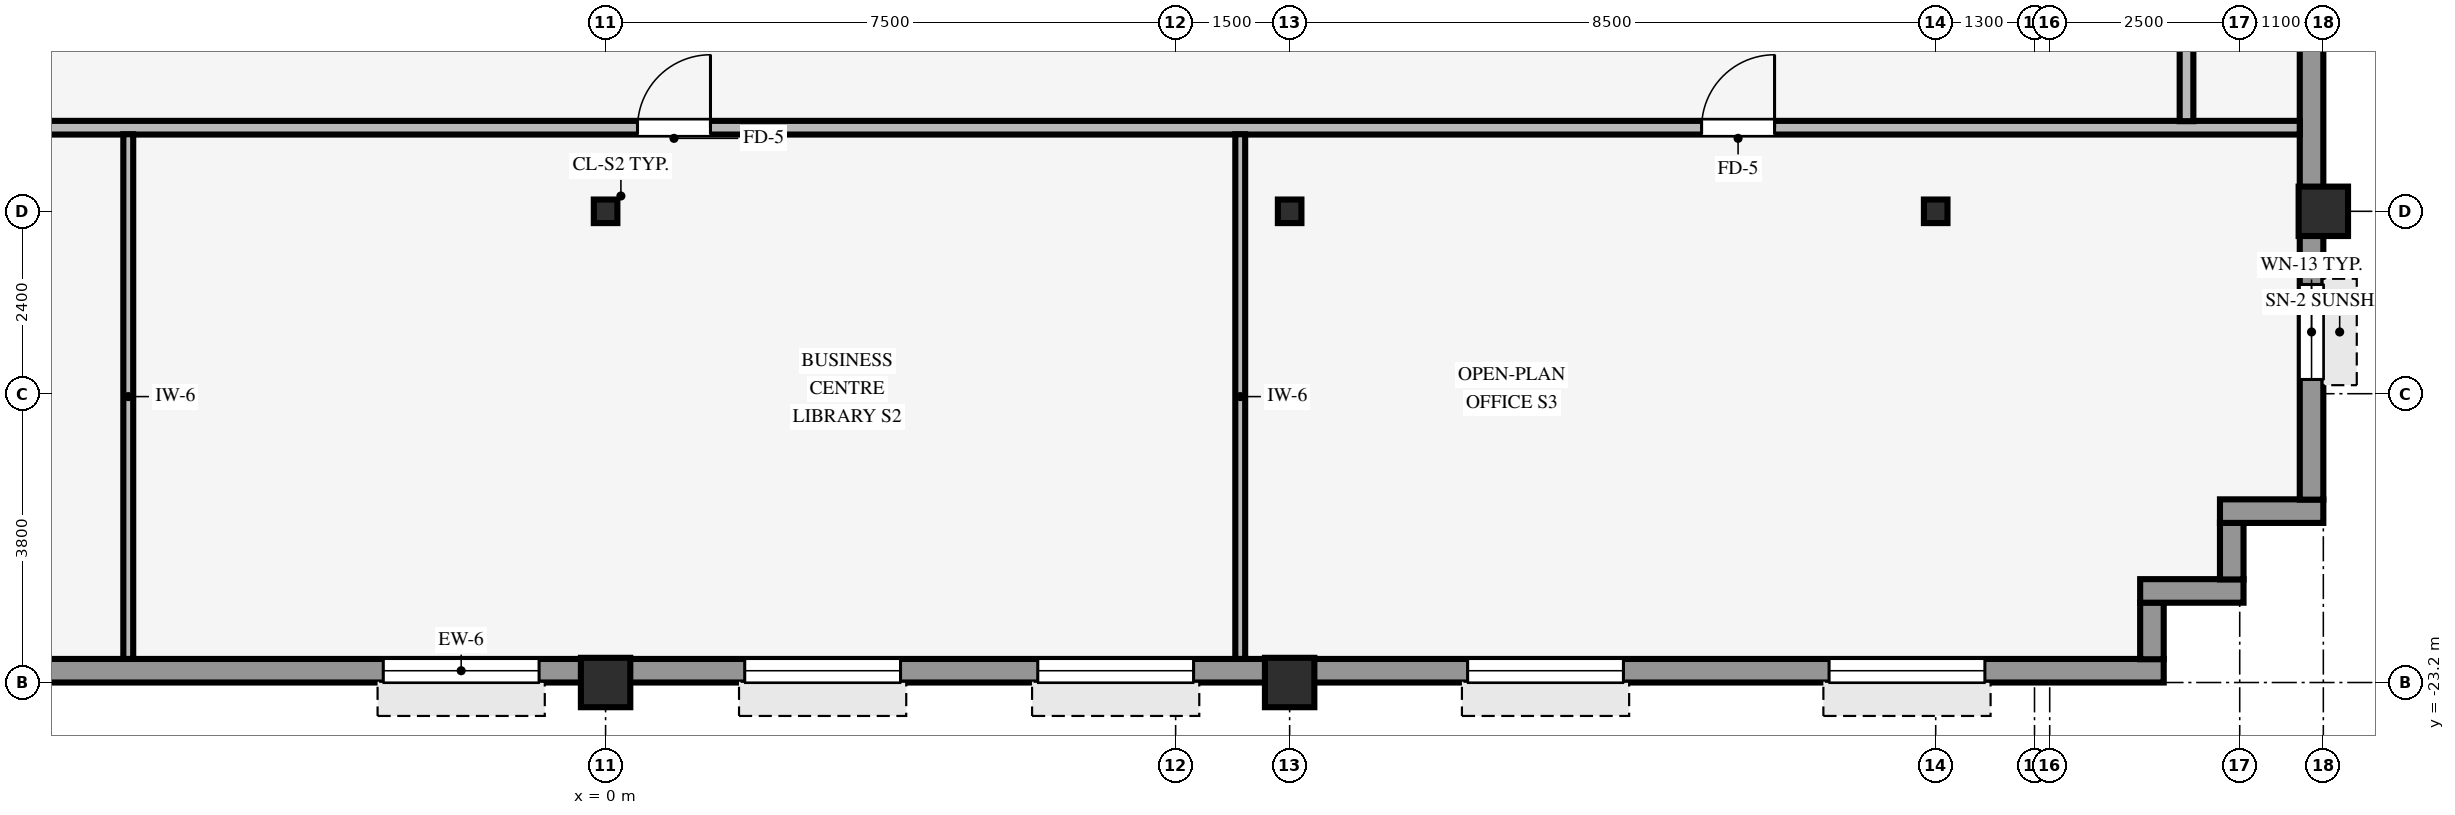
"""IFC4 building model, lengths in metres.
Left out: names, types, materials, properties, quantities, classifications, styles, units other than length and angle.
Written with IfcOpenShell. Run it as: python <this file> out.ifc"""

import sys

from ifc_helpers import new_model, si_unit, direction, frame, frame_2d, origin, origin_2d, place, context, subcontext, project, spatial, rectangle, hollow_rectangle, i_section, extrude, source, transform, mapped, element, fill, save


model = new_model("IFC4")
c1 = context("Model", 3, precision=1e-05, world=origin(), true_north=direction((0.0, 1.0)))
c2 = subcontext(c1, "Body", "Model", "MODEL_VIEW")
j1 = project(units=[si_unit("LENGTHUNIT", "METRE"), si_unit("PLANEANGLEUNIT", "RADIAN")], contexts=[c1])
p1 = place(None, origin())
s1 = spatial("IfcSite", under=j1, at=p1, CompositionType="ELEMENT")
p2 = place(p1, origin())
s2 = spatial("IfcBuilding", under=s1, at=p2, CompositionType="ELEMENT")
p3 = place(p2, frame((0.0, 0.0, 174.95)))
s3 = spatial("IfcBuildingStorey", under=s2, at=p3, CompositionType="ELEMENT", Elevation=174.95)
for number, where, z_axis, x_axis in (
    (1, (22.6, -17.0, 0.0), (0.0, 0.0, 1.0), (1.0, 0.0, 0.0)),
    (2, (0.0, -23.2, 0.0), (0.0, 0.0, 1.0), (1.0, 0.0, 0.0)),
    (3, (9.0, -23.2, 0.0), (0.0, 0.0, 1.0), (1.0, 0.0, 0.0)),
):
    element("IfcColumn", number, at=place(p3, frame(where, z_axis=z_axis, x_axis=x_axis)), inside=s3, PredefinedType="COLUMN", context=c2, shape_type="SweptSolid", body=[
        extrude(hollow_rectangle(XDim=0.65, YDim=0.65, WallThickness=0.04, InnerFilletRadius=0.04, OuterFilletRadius=0.08, at=origin_2d()), origin(), (0.0, 0.0, 1.0), 3.37),
    ])
for number, where, z_axis, x_axis in (
    (4, (0.0, -17.0, 0.0), (0.0, 0.0, 1.0), (1.0, 0.0, 0.0)),
    (5, (9.0, -17.0, 0.0), (0.0, 0.0, 1.0), (1.0, 0.0, 0.0)),
    (6, (17.5, -17.0, 0.0), (0.0, 0.0, 1.0), (1.0, 0.0, 0.0)),
):
    element("IfcColumn", number, at=place(p3, frame(where, z_axis=z_axis, x_axis=x_axis)), inside=s3, PredefinedType="COLUMN", context=c2, shape_type="SweptSolid", body=[
        extrude(i_section(OverallWidth=0.31, OverallDepth=0.31, WebThickness=0.015, FlangeThickness=0.015, FilletRadius=0.015, at=origin_2d()), origin(), (0.0, 0.0, 1.0), 3.37),
    ])
p4 = place(p3, frame((-24.3, -23.045, 0.0), z_axis=(0.0, 0.0, 1.0), x_axis=(1.0, 0.0, 0.0)))
e7 = element("IfcWall", 7, at=p4, inside=s3, PredefinedType="STANDARD", context=c2, shape_type="SweptSolid", body=[
    extrude(rectangle(XDim=44.8, YDim=0.31, at=frame_2d((22.4, 0.0))), origin(), (0.0, 0.0, 1.0), 2.705),
])
p5 = place(p4, frame((2.353, 0.0, 0.8)))
e8 = element("IfcOpeningElement", 8, at=p5, cuts=e7, PredefinedType="OPENING", context=c2, shape_type="SweptSolid", body=[
    extrude(rectangle(XDim=2.05, YDim=1.52, at=frame_2d((1.025, 0.76))), frame((0.0, 0.165, 0.0), z_axis=(0.0, -1.0, 0.0), x_axis=(1.0, 0.0, 0.0)), (0.0, 0.0, 1.0), 0.33),
])
p6 = place(p4, frame((7.108, 0.0, 0.8)))
e9 = element("IfcOpeningElement", 9, at=p6, cuts=e7, PredefinedType="OPENING", context=c2, shape_type="SweptSolid", body=[
    extrude(rectangle(XDim=2.05, YDim=1.52, at=frame_2d((1.025, 0.76))), frame((0.0, 0.165, 0.0), z_axis=(0.0, -1.0, 0.0), x_axis=(1.0, 0.0, 0.0)), (0.0, 0.0, 1.0), 0.33),
])
p7 = place(p4, frame((11.864, 0.0, 0.8)))
e10 = element("IfcOpeningElement", 10, at=p7, cuts=e7, PredefinedType="OPENING", context=c2, shape_type="SweptSolid", body=[
    extrude(rectangle(XDim=2.05, YDim=1.52, at=frame_2d((1.025, 0.76))), frame((0.0, 0.165, 0.0), z_axis=(0.0, -1.0, 0.0), x_axis=(1.0, 0.0, 0.0)), (0.0, 0.0, 1.0), 0.33),
])
p8 = place(p4, frame((21.375, 0.0, 0.8)))
e11 = element("IfcOpeningElement", 11, at=p8, cuts=e7, PredefinedType="OPENING", context=c2, shape_type="SweptSolid", body=[
    extrude(rectangle(XDim=2.05, YDim=1.52, at=frame_2d((1.025, 0.76))), frame((0.0, 0.165, 0.0), z_axis=(0.0, -1.0, 0.0), x_axis=(1.0, 0.0, 0.0)), (0.0, 0.0, 1.0), 0.33),
])
p9 = place(p4, frame((26.131, 0.0, 0.8)))
e12 = element("IfcOpeningElement", 12, at=p9, cuts=e7, PredefinedType="OPENING", context=c2, shape_type="SweptSolid", body=[
    extrude(rectangle(XDim=2.05, YDim=1.52, at=frame_2d((1.025, 0.76))), frame((0.0, 0.165, 0.0), z_axis=(0.0, -1.0, 0.0), x_axis=(1.0, 0.0, 0.0)), (0.0, 0.0, 1.0), 0.33),
])
p10 = place(p4, frame((29.986, 0.0, 0.8)))
e13 = element("IfcOpeningElement", 13, at=p10, cuts=e7, PredefinedType="OPENING", context=c2, shape_type="SweptSolid", body=[
    extrude(rectangle(XDim=2.05, YDim=1.52, at=frame_2d((1.025, 0.76))), frame((0.0, 0.165, 0.0), z_axis=(0.0, -1.0, 0.0), x_axis=(1.0, 0.0, 0.0)), (0.0, 0.0, 1.0), 0.33),
])
p11 = place(p4, frame((35.642, 0.0, 0.8)))
e14 = element("IfcOpeningElement", 14, at=p11, cuts=e7, PredefinedType="OPENING", context=c2, shape_type="SweptSolid", body=[
    extrude(rectangle(XDim=2.05, YDim=1.52, at=frame_2d((1.025, 0.76))), frame((0.0, 0.165, 0.0), z_axis=(0.0, -1.0, 0.0), x_axis=(1.0, 0.0, 0.0)), (0.0, 0.0, 1.0), 0.33),
])
p12 = place(p4, frame((40.397, 0.0, 0.8)))
e15 = element("IfcOpeningElement", 15, at=p12, cuts=e7, PredefinedType="OPENING", context=c2, shape_type="SweptSolid", body=[
    extrude(rectangle(XDim=2.05, YDim=1.52, at=frame_2d((1.025, 0.76))), frame((0.0, 0.165, 0.0), z_axis=(0.0, -1.0, 0.0), x_axis=(1.0, 0.0, 0.0)), (0.0, 0.0, 1.0), 0.33),
])
p13 = place(p3, frame((20.345, -22.894, 0.0), z_axis=(0.0, 0.0, 1.0), x_axis=(0.0, 1.0, 0.0)))
e16 = element("IfcWall", 16, at=p13, inside=s3, PredefinedType="STANDARD", context=c2, shape_type="SweptSolid", body=[
    extrude(rectangle(XDim=0.748, YDim=0.31, at=frame_2d((0.374, 0.0))), origin(), (0.0, 0.0, 1.0), 3.36),
])
p14 = place(p3, frame((20.19, -21.995, 0.0), z_axis=(0.0, 0.0, 1.0), x_axis=(1.0, 0.0, 0.0)))
e17 = element("IfcWall", 17, at=p14, inside=s3, PredefinedType="STANDARD", context=c2, shape_type="SweptSolid", body=[
    extrude(rectangle(XDim=1.36, YDim=0.31, at=frame_2d((0.68, 0.0))), origin(), (0.0, 0.0, 1.0), 3.36),
])
p15 = place(p3, frame((21.395, -21.844, 0.0), z_axis=(0.0, 0.0, 1.0), x_axis=(0.0, 1.0, 0.0)))
e18 = element("IfcWall", 18, at=p15, inside=s3, PredefinedType="STANDARD", context=c2, shape_type="SweptSolid", body=[
    extrude(rectangle(XDim=0.748, YDim=0.31, at=frame_2d((0.374, 0.0))), origin(), (0.0, 0.0, 1.0), 3.36),
])
p16 = place(p3, frame((21.24, -20.945, 0.0), z_axis=(0.0, 0.0, 1.0), x_axis=(1.0, 0.0, 0.0)))
e19 = element("IfcWall", 19, at=p16, inside=s3, PredefinedType="STANDARD", context=c2, shape_type="SweptSolid", body=[
    extrude(rectangle(XDim=1.36, YDim=0.31, at=frame_2d((0.68, 0.0))), origin(), (0.0, 0.0, 1.0), 3.36),
])
p17 = place(p3, frame((22.445, -20.794, 0.0), z_axis=(0.0, 0.0, 1.0), x_axis=(0.0, 1.0, 0.0)))
e20 = element("IfcWall", 20, at=p17, inside=s3, PredefinedType="STANDARD", context=c2, shape_type="SweptSolid", body=[
    extrude(rectangle(XDim=37.788, YDim=0.31, at=frame_2d((18.894, 0.0))), origin(), (0.0, 0.0, 1.0), 2.705),
])
p18 = place(p17, frame((16.474, 0.0, 0.0), z_axis=(0.0, 0.0, 1.0), x_axis=(-1.0, 0.0, 0.0)))
e21 = element("IfcOpeningElement", 21, at=p18, cuts=e20, PredefinedType="OPENING", context=c2, shape_type="SweptSolid", body=[
    extrude(rectangle(XDim=0.98, YDim=2.15, at=frame_2d((0.49, 1.075))), frame((0.0, 0.165, 0.0), z_axis=(0.0, -1.0, 0.0), x_axis=(1.0, 0.0, 0.0)), (0.0, 0.0, 1.0), 0.33),
])
p19 = place(p17, frame((1.581, 0.0, 0.8)))
e22 = element("IfcOpeningElement", 22, at=p19, cuts=e20, PredefinedType="OPENING", context=c2, shape_type="SweptSolid", body=[
    extrude(rectangle(XDim=1.25, YDim=1.52, at=frame_2d((0.625, 0.76))), frame((0.0, 0.165, 0.0), z_axis=(0.0, -1.0, 0.0), x_axis=(1.0, 0.0, 0.0)), (0.0, 0.0, 1.0), 0.33),
])
p20 = place(p17, frame((8.044, 0.0, 0.8)))
e23 = element("IfcOpeningElement", 23, at=p20, cuts=e20, PredefinedType="OPENING", context=c2, shape_type="SweptSolid", body=[
    extrude(rectangle(XDim=1.25, YDim=1.52, at=frame_2d((0.625, 0.76))), frame((0.0, 0.165, 0.0), z_axis=(0.0, -1.0, 0.0), x_axis=(1.0, 0.0, 0.0)), (0.0, 0.0, 1.0), 0.33),
])
p21 = place(p17, frame((13.156, 0.0, 0.8)))
e24 = element("IfcOpeningElement", 24, at=p21, cuts=e20, PredefinedType="OPENING", context=c2, shape_type="SweptSolid", body=[
    extrude(rectangle(XDim=1.25, YDim=1.52, at=frame_2d((0.625, 0.76))), frame((0.0, 0.165, 0.0), z_axis=(0.0, -1.0, 0.0), x_axis=(1.0, 0.0, 0.0)), (0.0, 0.0, 1.0), 0.33),
])
p22 = place(p17, frame((18.269, 0.0, 0.8)))
e25 = element("IfcOpeningElement", 25, at=p22, cuts=e20, PredefinedType="OPENING", context=c2, shape_type="SweptSolid", body=[
    extrude(rectangle(XDim=1.25, YDim=1.52, at=frame_2d((0.625, 0.76))), frame((0.0, 0.165, 0.0), z_axis=(0.0, -1.0, 0.0), x_axis=(1.0, 0.0, 0.0)), (0.0, 0.0, 1.0), 0.33),
])
p23 = place(p17, frame((23.382, 0.0, 0.8)))
e26 = element("IfcOpeningElement", 26, at=p23, cuts=e20, PredefinedType="OPENING", context=c2, shape_type="SweptSolid", body=[
    extrude(rectangle(XDim=1.25, YDim=1.52, at=frame_2d((0.625, 0.76))), frame((0.0, 0.165, 0.0), z_axis=(0.0, -1.0, 0.0), x_axis=(1.0, 0.0, 0.0)), (0.0, 0.0, 1.0), 0.33),
])
p24 = place(p17, frame((28.044, 0.0, 0.8)))
e27 = element("IfcOpeningElement", 27, at=p24, cuts=e20, PredefinedType="OPENING", context=c2, shape_type="SweptSolid", body=[
    extrude(rectangle(XDim=1.25, YDim=1.52, at=frame_2d((0.625, 0.76))), frame((0.0, 0.165, 0.0), z_axis=(0.0, -1.0, 0.0), x_axis=(1.0, 0.0, 0.0)), (0.0, 0.0, 1.0), 0.33),
])
p25 = place(p17, frame((33.607, 0.0, 0.8)))
e28 = element("IfcOpeningElement", 28, at=p25, cuts=e20, PredefinedType="OPENING", context=c2, shape_type="SweptSolid", body=[
    extrude(rectangle(XDim=1.25, YDim=1.52, at=frame_2d((0.625, 0.76))), frame((0.0, 0.165, 0.0), z_axis=(0.0, -1.0, 0.0), x_axis=(1.0, 0.0, 0.0)), (0.0, 0.0, 1.0), 0.33),
])
p26 = place(p3, frame((-26.09, -15.9, 0.0), z_axis=(0.0, 0.0, 1.0), x_axis=(1.0, 0.0, 0.0)))
e29 = element("IfcWall", 29, at=p26, inside=s3, PredefinedType="PARTITIONING", context=c2, shape_type="SweptSolid", body=[
    extrude(rectangle(XDim=48.38, YDim=0.18, at=frame_2d((24.19, 0.0))), origin(), (0.0, 0.0, 1.0), 3.36),
])
p27 = place(p26, frame((26.51, 0.0, 0.0)))
e30 = element("IfcOpeningElement", 30, at=p27, cuts=e29, PredefinedType="OPENING", context=c2, shape_type="SweptSolid", body=[
    extrude(rectangle(XDim=0.96, YDim=2.1, at=frame_2d((0.48, 1.05))), frame((0.0, 0.1, 0.0), z_axis=(0.0, -1.0, 0.0), x_axis=(1.0, 0.0, 0.0)), (0.0, 0.0, 1.0), 0.2),
])
p28 = place(p26, frame((40.51, 0.0, 0.0)))
e31 = element("IfcOpeningElement", 31, at=p28, cuts=e29, PredefinedType="OPENING", context=c2, shape_type="SweptSolid", body=[
    extrude(rectangle(XDim=0.96, YDim=2.1, at=frame_2d((0.48, 1.05))), frame((0.0, 0.1, 0.0), z_axis=(0.0, -1.0, 0.0), x_axis=(1.0, 0.0, 0.0)), (0.0, 0.0, 1.0), 0.2),
])
p29 = place(p26, frame((13.62, 0.0, 0.0)))
e32 = element("IfcOpeningElement", 32, at=p29, cuts=e29, PredefinedType="OPENING", context=c2, shape_type="SweptSolid", body=[
    extrude(rectangle(XDim=0.96, YDim=2.1, at=frame_2d((0.48, 1.05))), frame((0.0, 0.1, 0.0), z_axis=(0.0, -1.0, 0.0), x_axis=(1.0, 0.0, 0.0)), (0.0, 0.0, 1.0), 0.2),
])
for number, where, z_axis, x_axis in (
    (33, (-6.28, -22.89, 0.0), (0.0, 0.0, 1.0), (0.0, 1.0, 0.0)),
    (34, (8.35, -22.89, 0.0), (0.0, 0.0, 1.0), (0.0, 1.0, 0.0)),
):
    element("IfcWall", number, at=place(p3, frame(where, z_axis=z_axis, x_axis=x_axis)), inside=s3, PredefinedType="PARTITIONING", context=c2, shape_type="SweptSolid", body=[
        extrude(rectangle(XDim=6.904, YDim=0.13, at=frame_2d((3.452, 0.0))), origin(), (0.0, 0.0, 1.0), 3.36),
    ])
p30 = place(p3, frame((20.8, -15.814, 0.0), z_axis=(0.0, 0.0, 1.0), x_axis=(0.0, 1.0, 0.0)))
e35 = element("IfcWall", 35, at=p30, inside=s3, PredefinedType="PARTITIONING", context=c2, shape_type="SweptSolid", body=[
    extrude(rectangle(XDim=2.228, YDim=0.18, at=frame_2d((1.114, 0.0))), origin(), (0.0, 0.0, 1.0), 3.36),
])
m1 = source(origin(), c2, "Body", "SweptSolid", [
    extrude(rectangle(XDim=2.05, YDim=1.52, at=frame_2d((1.025, 0.76))), frame((0.0, 0.03, 0.0), z_axis=(0.0, -1.0, 0.0), x_axis=(1.0, 0.0, 0.0)), (0.0, 0.0, 1.0), 0.06),
])
p31 = place(p8, origin())
e36 = element("IfcWindow", 36, at=p31, inside=s3, PartitioningType="SINGLE_PANEL", PredefinedType="WINDOW", context=c2, shape_type="MappedRepresentation", body=[
    mapped(m1, transform((0.0, 0.0, 0.0), scale=1.0)),
])
fill(e11, e36)
p32 = place(p9, origin())
e37 = element("IfcWindow", 37, at=p32, inside=s3, PartitioningType="SINGLE_PANEL", PredefinedType="WINDOW", context=c2, shape_type="MappedRepresentation", body=[
    mapped(m1, transform((0.0, 0.0, 0.0), scale=1.0)),
])
fill(e12, e37)
p33 = place(p10, origin())
e38 = element("IfcWindow", 38, at=p33, inside=s3, PartitioningType="SINGLE_PANEL", PredefinedType="WINDOW", context=c2, shape_type="MappedRepresentation", body=[
    mapped(m1, transform((0.0, 0.0, 0.0), scale=1.0)),
])
fill(e13, e38)
p34 = place(p11, origin())
e39 = element("IfcWindow", 39, at=p34, inside=s3, PartitioningType="SINGLE_PANEL", PredefinedType="WINDOW", context=c2, shape_type="MappedRepresentation", body=[
    mapped(m1, transform((0.0, 0.0, 0.0), scale=1.0)),
])
fill(e14, e39)
p35 = place(p12, origin())
e40 = element("IfcWindow", 40, at=p35, inside=s3, PartitioningType="SINGLE_PANEL", PredefinedType="WINDOW", context=c2, shape_type="MappedRepresentation", body=[
    mapped(m1, transform((0.0, 0.0, 0.0), scale=1.0)),
])
fill(e15, e40)
m2 = source(origin(), c2, "Body", "SweptSolid", [
    extrude(rectangle(XDim=1.25, YDim=1.52, at=frame_2d((0.625, 0.76))), frame((0.0, 0.03, 0.0), z_axis=(0.0, -1.0, 0.0), x_axis=(1.0, 0.0, 0.0)), (0.0, 0.0, 1.0), 0.06),
])
p36 = place(p19, origin())
e41 = element("IfcWindow", 41, at=p36, inside=s3, PartitioningType="SINGLE_PANEL", PredefinedType="WINDOW", context=c2, shape_type="MappedRepresentation", body=[
    mapped(m2, transform((0.0, 0.0, 0.0), scale=1.0)),
])
fill(e22, e41)
m3 = source(origin(), c2, "Body", "SweptSolid", [
    extrude(rectangle(XDim=0.96, YDim=2.1, at=frame_2d((0.48, 1.05))), frame((0.0, 0.025, 0.0), z_axis=(0.0, -1.0, 0.0), x_axis=(1.0, 0.0, 0.0)), (0.0, 0.0, 1.0), 0.05),
])
p37 = place(p27, origin())
e42 = element("IfcDoor", 42, at=p37, inside=s3, OperationType="SINGLE_SWING_RIGHT", PredefinedType="DOOR", context=c2, shape_type="MappedRepresentation", body=[
    mapped(m3, transform((0.0, 0.0, 0.0), scale=1.0)),
])
fill(e30, e42)
p38 = place(p28, origin())
e43 = element("IfcDoor", 43, at=p38, inside=s3, OperationType="SINGLE_SWING_RIGHT", PredefinedType="DOOR", context=c2, shape_type="MappedRepresentation", body=[
    mapped(m3, transform((0.0, 0.0, 0.0), scale=1.0)),
])
fill(e31, e43)
save(model, sys.argv[1])
